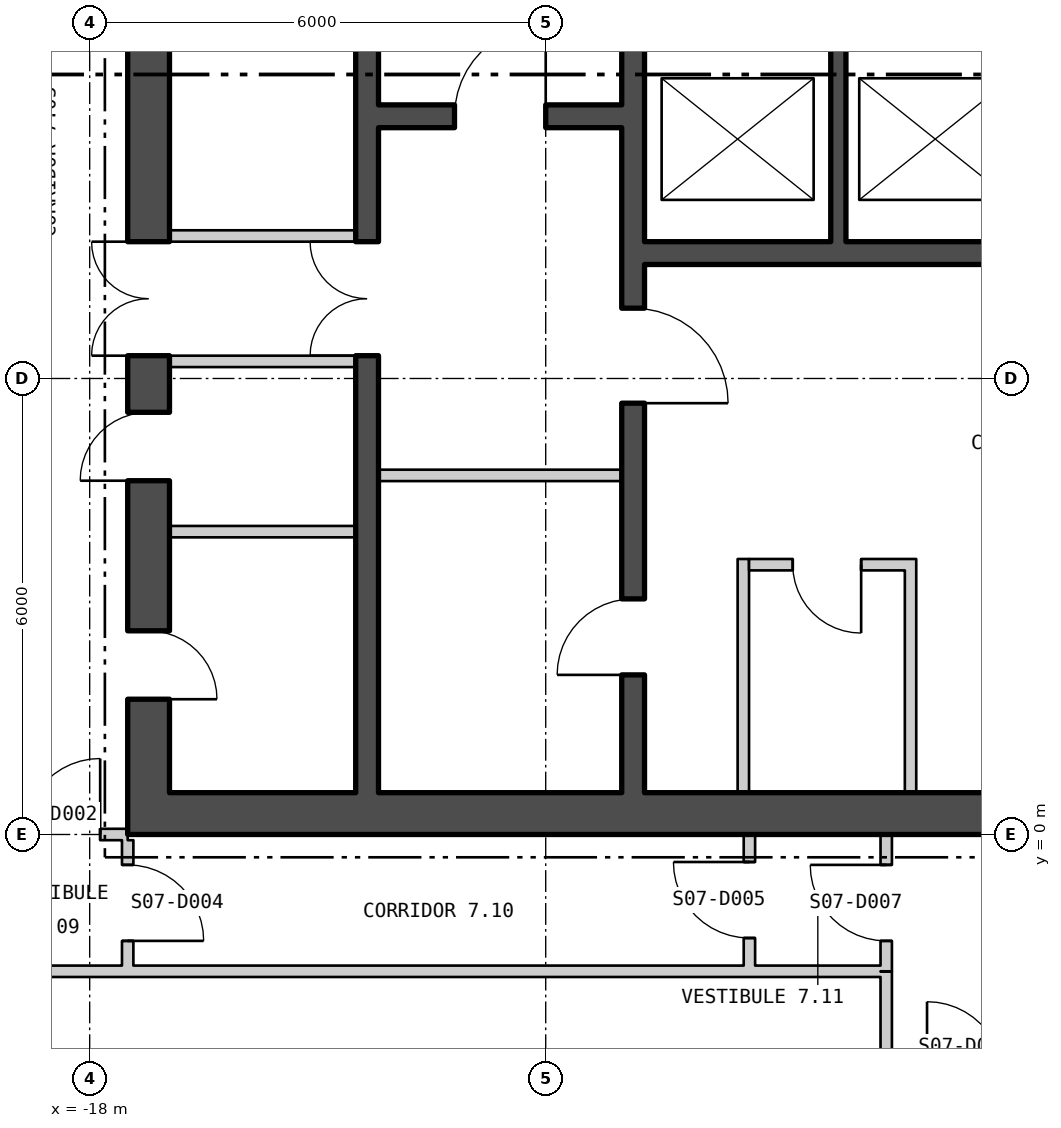
"""IFC4 building model, lengths in metres.
Left out: names, types, materials, properties, quantities, classifications, styles, units other than length and angle.
Written with IfcOpenShell. Run it as: python <this file> out.ifc"""

import sys

from ifc_helpers import new_model, si_unit, direction, frame, frame_2d, origin, place, context, subcontext, project, spatial, polyline, rectangle, outline, extrude, element, fill, save


model = new_model("IFC4")
c1 = context("Model", 3, precision=1e-05, world=origin(), true_north=direction((0.0, 1.0)))
c2 = subcontext(c1, "Body", "Model", "MODEL_VIEW")
j1 = project(units=[si_unit("LENGTHUNIT", "METRE"), si_unit("PLANEANGLEUNIT", "RADIAN")], contexts=[c1])
p1 = place(None, origin())
s1 = spatial("IfcSite", under=j1, at=p1, CompositionType="ELEMENT")
p2 = place(p1, origin())
s2 = spatial("IfcBuilding", under=s1, at=p2, CompositionType="ELEMENT")
p3 = place(p2, frame((0.0, 0.0, 97.8)))
s3 = spatial("IfcBuildingStorey", under=s2, at=p3, CompositionType="ELEMENT", Elevation=97.8)
p4 = place(p3, frame((-27.775, 11.479, -0.18), z_axis=(0.0, 0.0, 1.0), x_axis=(0.500000711659, -0.866024992908, 0.0)))
e1 = element("IfcWall", 1, at=p4, inside=s3, PredefinedType="SOLIDWALL", context=c2, shape_type="SweptSolid", body=[
    extrude(outline(polyline([(-0.13, -0.225), (45.87, -0.225), (45.61, 0.225), (0.13, 0.225), (-0.13, -0.225)])), origin(), (0.0, 0.0, 1.0), 4.28),
])
p5 = place(p4, frame((1.424, 0.0, 1.08)))
e2 = element("IfcOpeningElement", 2, at=p5, cuts=e1, PredefinedType="OPENING", context=c2, shape_type="SweptSolid", body=[
    extrude(rectangle(XDim=2.4, YDim=2.6, at=frame_2d((1.2, 1.3))), frame((0.0, 0.235, 0.0), z_axis=(0.0, -1.0, 0.0), x_axis=(1.0, 0.0, 0.0)), (0.0, 0.0, 1.0), 0.47),
])
p6 = place(p4, frame((5.893, 0.0, 1.08)))
e3 = element("IfcOpeningElement", 3, at=p6, cuts=e1, PredefinedType="OPENING", context=c2, shape_type="SweptSolid", body=[
    extrude(rectangle(XDim=2.4, YDim=2.6, at=frame_2d((1.2, 1.3))), frame((0.0, 0.235, 0.0), z_axis=(0.0, -1.0, 0.0), x_axis=(1.0, 0.0, 0.0)), (0.0, 0.0, 1.0), 0.47),
])
p7 = place(p4, frame((10.401, 0.0, 1.08)))
e4 = element("IfcOpeningElement", 4, at=p7, cuts=e1, PredefinedType="OPENING", context=c2, shape_type="SweptSolid", body=[
    extrude(rectangle(XDim=2.4, YDim=2.6, at=frame_2d((1.2, 1.3))), frame((0.0, 0.235, 0.0), z_axis=(0.0, -1.0, 0.0), x_axis=(1.0, 0.0, 0.0)), (0.0, 0.0, 1.0), 0.47),
])
p8 = place(p4, frame((14.909, 0.0, 1.08)))
e5 = element("IfcOpeningElement", 5, at=p8, cuts=e1, PredefinedType="OPENING", context=c2, shape_type="SweptSolid", body=[
    extrude(rectangle(XDim=2.4, YDim=2.6, at=frame_2d((1.2, 1.3))), frame((0.0, 0.235, 0.0), z_axis=(0.0, -1.0, 0.0), x_axis=(1.0, 0.0, 0.0)), (0.0, 0.0, 1.0), 0.47),
])
p9 = place(p4, frame((19.416, 0.0, 1.08)))
e6 = element("IfcOpeningElement", 6, at=p9, cuts=e1, PredefinedType="OPENING", context=c2, shape_type="SweptSolid", body=[
    extrude(rectangle(XDim=2.4, YDim=2.6, at=frame_2d((1.2, 1.3))), frame((0.0, 0.235, 0.0), z_axis=(0.0, -1.0, 0.0), x_axis=(1.0, 0.0, 0.0)), (0.0, 0.0, 1.0), 0.47),
])
p10 = place(p4, frame((23.924, 0.0, 1.08)))
e7 = element("IfcOpeningElement", 7, at=p10, cuts=e1, PredefinedType="OPENING", context=c2, shape_type="SweptSolid", body=[
    extrude(rectangle(XDim=2.4, YDim=2.6, at=frame_2d((1.2, 1.3))), frame((0.0, 0.235, 0.0), z_axis=(0.0, -1.0, 0.0), x_axis=(1.0, 0.0, 0.0)), (0.0, 0.0, 1.0), 0.47),
])
p11 = place(p4, frame((28.431, 0.0, 1.08)))
e8 = element("IfcOpeningElement", 8, at=p11, cuts=e1, PredefinedType="OPENING", context=c2, shape_type="SweptSolid", body=[
    extrude(rectangle(XDim=2.4, YDim=2.6, at=frame_2d((1.2, 1.3))), frame((0.0, 0.235, 0.0), z_axis=(0.0, -1.0, 0.0), x_axis=(1.0, 0.0, 0.0)), (0.0, 0.0, 1.0), 0.47),
])
p12 = place(p4, frame((32.939, 0.0, 1.08)))
e9 = element("IfcOpeningElement", 9, at=p12, cuts=e1, PredefinedType="OPENING", context=c2, shape_type="SweptSolid", body=[
    extrude(rectangle(XDim=2.4, YDim=2.6, at=frame_2d((1.2, 1.3))), frame((0.0, 0.235, 0.0), z_axis=(0.0, -1.0, 0.0), x_axis=(1.0, 0.0, 0.0)), (0.0, 0.0, 1.0), 0.47),
])
p13 = place(p4, frame((37.447, 0.0, 1.08)))
e10 = element("IfcOpeningElement", 10, at=p13, cuts=e1, PredefinedType="OPENING", context=c2, shape_type="SweptSolid", body=[
    extrude(rectangle(XDim=2.4, YDim=2.6, at=frame_2d((1.2, 1.3))), frame((0.0, 0.235, 0.0), z_axis=(0.0, -1.0, 0.0), x_axis=(1.0, 0.0, 0.0)), (0.0, 0.0, 1.0), 0.47),
])
p14 = place(p4, frame((41.916, 0.0, 1.08)))
e11 = element("IfcOpeningElement", 11, at=p14, cuts=e1, PredefinedType="OPENING", context=c2, shape_type="SweptSolid", body=[
    extrude(rectangle(XDim=2.4, YDim=2.6, at=frame_2d((1.2, 1.3))), frame((0.0, 0.235, 0.0), z_axis=(0.0, -1.0, 0.0), x_axis=(1.0, 0.0, 0.0)), (0.0, 0.0, 1.0), 0.47),
])
p15 = place(p3, frame((-17.5, 0.275, 0.0), z_axis=(0.0, 0.0, 1.0), x_axis=(1.0, 0.0, 0.0)))
e12 = element("IfcWall", 12, at=p15, inside=s3, PredefinedType="SHEAR", context=c2, shape_type="SweptSolid", body=[
    extrude(rectangle(XDim=35.0, YDim=0.55, at=frame_2d((17.5, 0.0))), origin(), (0.0, 0.0, 1.0), 4.3),
])
p16 = place(p15, frame((12.0, 0.0, 0.0)))
e13 = element("IfcOpeningElement", 13, at=p16, cuts=e12, PredefinedType="OPENING", context=c2, shape_type="SweptSolid", body=[
    extrude(rectangle(XDim=1.8, YDim=2.4, at=frame_2d((0.9, 1.2))), frame((0.0, 0.285, 0.0), z_axis=(0.0, -1.0, 0.0), x_axis=(1.0, 0.0, 0.0)), (0.0, 0.0, 1.0), 0.57),
])
p17 = place(p15, frame((22.0, 0.0, 0.0)))
e14 = element("IfcOpeningElement", 14, at=p17, cuts=e12, PredefinedType="OPENING", context=c2, shape_type="SweptSolid", body=[
    extrude(rectangle(XDim=1.8, YDim=2.4, at=frame_2d((0.9, 1.2))), frame((0.0, 0.285, 0.0), z_axis=(0.0, -1.0, 0.0), x_axis=(1.0, 0.0, 0.0)), (0.0, 0.0, 1.0), 0.57),
])
p18 = place(p3, frame((-17.225, 0.55, 0.0), z_axis=(0.0, 0.0, 1.0), x_axis=(0.0, 1.0, 0.0)))
e15 = element("IfcWall", 15, at=p18, inside=s3, PredefinedType="SHEAR", context=c2, shape_type="SweptSolid", body=[
    extrude(rectangle(XDim=16.9, YDim=0.55, at=frame_2d((8.45, 0.0))), origin(), (0.0, 0.0, 1.0), 4.3),
])
p19 = place(p18, frame((5.75, 0.0, 0.0)))
e16 = element("IfcOpeningElement", 16, at=p19, cuts=e15, PredefinedType="OPENING", context=c2, shape_type="SweptSolid", body=[
    extrude(rectangle(XDim=1.5, YDim=2.1, at=frame_2d((0.75, 1.05))), frame((0.0, 0.285, 0.0), z_axis=(0.0, -1.0, 0.0), x_axis=(1.0, 0.0, 0.0)), (0.0, 0.0, 1.0), 0.57),
])
p20 = place(p18, frame((1.23, 0.0, 0.0)))
e17 = element("IfcOpeningElement", 17, at=p20, cuts=e15, PredefinedType="OPENING", context=c2, shape_type="SweptSolid", body=[
    extrude(rectangle(XDim=0.9, YDim=2.1, at=frame_2d((0.45, 1.05))), frame((0.0, 0.285, 0.0), z_axis=(0.0, -1.0, 0.0), x_axis=(1.0, 0.0, 0.0)), (0.0, 0.0, 1.0), 0.57),
])
p21 = place(p18, frame((4.105, 0.0, 0.0)))
e18 = element("IfcOpeningElement", 18, at=p21, cuts=e15, PredefinedType="OPENING", context=c2, shape_type="SweptSolid", body=[
    extrude(rectangle(XDim=0.9, YDim=2.1, at=frame_2d((0.45, 1.05))), frame((0.0, 0.285, 0.0), z_axis=(0.0, -1.0, 0.0), x_axis=(1.0, 0.0, 0.0)), (0.0, 0.0, 1.0), 0.57),
])
p22 = place(p18, frame((10.452, 0.0, 0.0)))
e19 = element("IfcOpeningElement", 19, at=p22, cuts=e15, PredefinedType="OPENING", context=c2, shape_type="SweptSolid", body=[
    extrude(rectangle(XDim=0.9, YDim=2.1, at=frame_2d((0.45, 1.05))), frame((0.0, 0.285, 0.0), z_axis=(0.0, -1.0, 0.0), x_axis=(1.0, 0.0, 0.0)), (0.0, 0.0, 1.0), 0.57),
])
p23 = place(p18, frame((15.227, 0.0, 0.0)))
e20 = element("IfcOpeningElement", 20, at=p23, cuts=e15, PredefinedType="OPENING", context=c2, shape_type="SweptSolid", body=[
    extrude(rectangle(XDim=1.0, YDim=2.1, at=frame_2d((0.5, 1.05))), frame((0.0, 0.285, 0.0), z_axis=(0.0, -1.0, 0.0), x_axis=(1.0, 0.0, 0.0)), (0.0, 0.0, 1.0), 0.57),
])
p24 = place(p3, frame((-10.85, 0.55, 0.0), z_axis=(0.0, 0.0, 1.0), x_axis=(0.0, 1.0, 0.0)))
e21 = element("IfcWall", 21, at=p24, inside=s3, PredefinedType="SHEAR", context=c2, shape_type="SweptSolid", body=[
    extrude(rectangle(XDim=16.9, YDim=0.3, at=frame_2d((8.45, 0.0))), origin(), (0.0, 0.0, 1.0), 4.3),
])
p25 = place(p24, frame((5.125, 0.0, 0.0)))
e22 = element("IfcOpeningElement", 22, at=p25, cuts=e21, PredefinedType="OPENING", context=c2, shape_type="SweptSolid", body=[
    extrude(rectangle(XDim=1.25, YDim=2.1, at=frame_2d((0.625, 1.05))), frame((0.0, 0.16, 0.0), z_axis=(0.0, -1.0, 0.0), x_axis=(1.0, 0.0, 0.0)), (0.0, 0.0, 1.0), 0.32),
])
p26 = place(p24, frame((1.55, 0.0, 0.0)))
e23 = element("IfcOpeningElement", 23, at=p26, cuts=e21, PredefinedType="OPENING", context=c2, shape_type="SweptSolid", body=[
    extrude(rectangle(XDim=1.0, YDim=2.1, at=frame_2d((0.5, 1.05))), frame((0.0, 0.16, 0.0), z_axis=(0.0, -1.0, 0.0), x_axis=(1.0, 0.0, 0.0)), (0.0, 0.0, 1.0), 0.32),
])
p27 = place(p3, frame((-14.35, 0.55, 0.0), z_axis=(0.0, 0.0, 1.0), x_axis=(0.0, 1.0, 0.0)))
e24 = element("IfcWall", 24, at=p27, inside=s3, PredefinedType="SHEAR", context=c2, shape_type="SweptSolid", body=[
    extrude(rectangle(XDim=16.9, YDim=0.3, at=frame_2d((8.45, 0.0))), origin(), (0.0, 0.0, 1.0), 4.3),
])
p28 = place(p27, frame((5.75, 0.0, 0.0)))
e25 = element("IfcOpeningElement", 25, at=p28, cuts=e24, PredefinedType="OPENING", context=c2, shape_type="SweptSolid", body=[
    extrude(rectangle(XDim=1.5, YDim=2.1, at=frame_2d((0.75, 1.05))), frame((0.0, 0.16, 0.0), z_axis=(0.0, -1.0, 0.0), x_axis=(1.0, 0.0, 0.0)), (0.0, 0.0, 1.0), 0.32),
])
p29 = place(p3, frame((-14.2, 9.45, 0.0), z_axis=(0.0, 0.0, 1.0), x_axis=(1.0, 0.0, 0.0)))
e26 = element("IfcWall", 26, at=p29, inside=s3, PredefinedType="SHEAR", context=c2, shape_type="SweptSolid", body=[
    extrude(rectangle(XDim=3.2, YDim=0.3, at=frame_2d((1.6, 0.0))), origin(), (0.0, 0.0, 1.0), 4.3),
])
p30 = place(p29, frame((1.0, 0.0, 0.0)))
e27 = element("IfcOpeningElement", 27, at=p30, cuts=e26, PredefinedType="OPENING", context=c2, shape_type="SweptSolid", body=[
    extrude(rectangle(XDim=1.2, YDim=2.1, at=frame_2d((0.6, 1.05))), frame((0.0, 0.16, 0.0), z_axis=(0.0, -1.0, 0.0), x_axis=(1.0, 0.0, 0.0)), (0.0, 0.0, 1.0), 0.32),
])
p31 = place(p3, frame((-10.7, 7.65, 0.0), z_axis=(0.0, 0.0, 1.0), x_axis=(1.0, 0.0, 0.0)))
e28 = element("IfcWall", 28, at=p31, inside=s3, PredefinedType="SHEAR", context=c2, shape_type="SweptSolid", body=[
    extrude(rectangle(XDim=10.3, YDim=0.3, at=frame_2d((5.15, 0.0))), origin(), (0.0, 0.0, 1.0), 4.3),
])
p32 = place(p3, frame((-8.15, 7.8, 0.0), z_axis=(0.0, 0.0, 1.0), x_axis=(0.0, 1.0, 0.0)))
e29 = element("IfcWall", 29, at=p32, inside=s3, PredefinedType="SHEAR", context=c2, shape_type="SweptSolid", body=[
    extrude(rectangle(XDim=2.7, YDim=0.2, at=frame_2d((1.35, 0.0))), origin(), (0.0, 0.0, 1.0), 4.3),
])
p33 = place(p3, frame((-14.2, 4.725, 0.0), z_axis=(0.0, 0.0, 1.0), x_axis=(1.0, 0.0, 0.0)))
e30 = element("IfcWall", 30, at=p33, inside=s3, PredefinedType="PARTITIONING", context=c2, shape_type="SweptSolid", body=[
    extrude(rectangle(XDim=3.2, YDim=0.15, at=frame_2d((1.6, 0.0))), origin(), (0.0, 0.0, 1.0), 4.3),
])
for number, where, z_axis, x_axis in (
    (31, (-16.95, 6.225, 0.0), (0.0, 0.0, 1.0), (1.0, 0.0, 0.0)),
    (32, (-16.95, 7.875, 0.0), (0.0, 0.0, 1.0), (1.0, 0.0, 0.0)),
    (33, (-16.95, 3.985, 0.0), (0.0, 0.0, 1.0), (1.0, 0.0, 0.0)),
):
    element("IfcWall", number, at=place(p3, frame(where, z_axis=z_axis, x_axis=x_axis)), inside=s3, PredefinedType="PARTITIONING", context=c2, shape_type="SweptSolid", body=[
        extrude(rectangle(XDim=2.45, YDim=0.15, at=frame_2d((1.225, 0.0))), origin(), (0.0, 0.0, 1.0), 4.3),
    ])
for number, where, z_axis, x_axis in (
    (34, (-9.4, 0.55, 0.0), (0.0, 0.0, 1.0), (0.0, 1.0, 0.0)),
    (35, (-7.2, 0.55, 0.0), (0.0, 0.0, 1.0), (0.0, 1.0, 0.0)),
):
    element("IfcWall", number, at=place(p3, frame(where, z_axis=z_axis, x_axis=x_axis)), inside=s3, PredefinedType="PARTITIONING", context=c2, shape_type="SweptSolid", body=[
        extrude(rectangle(XDim=3.075, YDim=0.15, at=frame_2d((1.538, 0.0))), origin(), (0.0, 0.0, 1.0), 4.3),
    ])
p34 = place(p3, frame((-9.325, 3.55, 0.0), z_axis=(0.0, 0.0, 1.0), x_axis=(1.0, 0.0, 0.0)))
e36 = element("IfcWall", 36, at=p34, inside=s3, PredefinedType="PARTITIONING", context=c2, shape_type="SweptSolid", body=[
    extrude(rectangle(XDim=2.05, YDim=0.15, at=frame_2d((1.025, 0.0))), origin(), (0.0, 0.0, 1.0), 4.3),
])
p35 = place(p34, frame((0.575, 0.0, 0.0)))
e37 = element("IfcOpeningElement", 37, at=p35, cuts=e36, PredefinedType="OPENING", context=c2, shape_type="SweptSolid", body=[
    extrude(rectangle(XDim=0.9, YDim=2.1, at=frame_2d((0.45, 1.05))), frame((0.0, 0.085, 0.0), z_axis=(0.0, -1.0, 0.0), x_axis=(1.0, 0.0, 0.0)), (0.0, 0.0, 1.0), 0.17),
])
p36 = place(p3, frame((-19.225, -1.8, 0.0), z_axis=(0.0, 0.0, 1.0), x_axis=(1.0, 0.0, 0.0)))
e38 = element("IfcWall", 38, at=p36, inside=s3, PredefinedType="PARTITIONING", context=c2, shape_type="SweptSolid", body=[
    extrude(rectangle(XDim=11.63, YDim=0.15, at=frame_2d((5.815, 0.0))), origin(), (0.0, 0.0, 1.0), 4.3),
])
p37 = place(p3, frame((-19.225, 0.0, 0.0), z_axis=(0.0, 0.0, 1.0), x_axis=(1.0, 0.0, 0.0)))
e39 = element("IfcWall", 39, at=p37, inside=s3, PredefinedType="PARTITIONING", context=c2, shape_type="SweptSolid", body=[
    extrude(rectangle(XDim=1.725, YDim=0.15, at=frame_2d((0.863, 0.0))), origin(), (0.0, 0.0, 1.0), 3.7),
])
p38 = place(p37, frame((0.363, 0.0, 0.0)))
e40 = element("IfcOpeningElement", 40, at=p38, cuts=e39, PredefinedType="OPENING", context=c2, shape_type="SweptSolid", body=[
    extrude(rectangle(XDim=1.0, YDim=2.1, at=frame_2d((0.5, 1.05))), frame((0.0, 0.085, 0.0), z_axis=(0.0, -1.0, 0.0), x_axis=(1.0, 0.0, 0.0)), (0.0, 0.0, 1.0), 0.17),
])
p39 = place(p3, frame((-17.5, -1.725, 0.0), z_axis=(0.0, 0.0, 1.0), x_axis=(0.0, 1.0, 0.0)))
e41 = element("IfcWall", 41, at=p39, inside=s3, PredefinedType="PARTITIONING", context=c2, shape_type="SweptSolid", body=[
    extrude(rectangle(XDim=1.65, YDim=0.15, at=frame_2d((0.825, 0.0))), origin(), (0.0, 0.0, 1.0), 4.3),
])
p40 = place(p39, frame((0.325, 0.0, 0.0)))
e42 = element("IfcOpeningElement", 42, at=p40, cuts=e41, PredefinedType="OPENING", context=c2, shape_type="SweptSolid", body=[
    extrude(rectangle(XDim=1.0, YDim=2.1, at=frame_2d((0.5, 1.05))), frame((0.0, 0.085, 0.0), z_axis=(0.0, -1.0, 0.0), x_axis=(1.0, 0.0, 0.0)), (0.0, 0.0, 1.0), 0.17),
])
p41 = place(p3, frame((-9.32, -1.725, 0.0), z_axis=(0.0, 0.0, 1.0), x_axis=(0.0, 1.0, 0.0)))
e43 = element("IfcWall", 43, at=p41, inside=s3, PredefinedType="PARTITIONING", context=c2, shape_type="SweptSolid", body=[
    extrude(rectangle(XDim=1.725, YDim=0.15, at=frame_2d((0.863, 0.0))), origin(), (0.0, 0.0, 1.0), 4.3),
])
p42 = place(p41, frame((0.363, 0.0, 0.0)))
e44 = element("IfcOpeningElement", 44, at=p42, cuts=e43, PredefinedType="OPENING", context=c2, shape_type="SweptSolid", body=[
    extrude(rectangle(XDim=1.0, YDim=2.1, at=frame_2d((0.5, 1.05))), frame((0.0, 0.085, 0.0), z_axis=(0.0, -1.0, 0.0), x_axis=(1.0, 0.0, 0.0)), (0.0, 0.0, 1.0), 0.17),
])
p43 = place(p3, frame((-7.52, -3.508, 0.0), z_axis=(0.0, 0.0, 1.0), x_axis=(0.0, 1.0, 0.0)))
e45 = element("IfcWall", 45, at=p43, inside=s3, PredefinedType="PARTITIONING", context=c2, shape_type="SweptSolid", body=[
    extrude(rectangle(XDim=1.704, YDim=0.15, at=frame_2d((0.852, 0.0))), origin(), (0.0, 0.0, 1.0), 4.3),
])
p44 = place(p3, frame((-7.52, -1.8, 0.0), z_axis=(0.0, 0.0, 1.0), x_axis=(0.0, 1.0, 0.0)))
e46 = element("IfcWall", 46, at=p44, inside=s3, PredefinedType="PARTITIONING", context=c2, shape_type="SweptSolid", body=[
    extrude(rectangle(XDim=1.8, YDim=0.15, at=frame_2d((0.9, 0.0))), origin(), (0.0, 0.0, 1.0), 4.3),
])
p45 = place(p44, frame((0.4, 0.0, 0.0)))
e47 = element("IfcOpeningElement", 47, at=p45, cuts=e46, PredefinedType="OPENING", context=c2, shape_type="SweptSolid", body=[
    extrude(rectangle(XDim=1.0, YDim=2.1, at=frame_2d((0.5, 1.05))), frame((0.0, 0.085, 0.0), z_axis=(0.0, -1.0, 0.0), x_axis=(1.0, 0.0, 0.0)), (0.0, 0.0, 1.0), 0.17),
])
p46 = place(p30, origin())
e48 = element("IfcDoor", 48, at=p46, inside=s3, OperationType="SINGLE_SWING_LEFT", PredefinedType="DOOR", context=c2, shape_type="SweptSolid", body=[
    extrude(rectangle(XDim=1.2, YDim=2.1, at=frame_2d((0.6, 1.05))), frame((0.0, 0.025, 0.0), z_axis=(0.0, -1.0, 0.0), x_axis=(1.0, 0.0, 0.0)), (0.0, 0.0, 1.0), 0.05),
])
fill(e27, e48)
p47 = place(p25, origin())
e49 = element("IfcDoor", 49, at=p47, inside=s3, OperationType="SINGLE_SWING_LEFT", PredefinedType="DOOR", context=c2, shape_type="SweptSolid", body=[
    extrude(rectangle(XDim=1.25, YDim=2.1, at=frame_2d((0.625, 1.05))), frame((0.0, 0.025, 0.0), z_axis=(0.0, -1.0, 0.0), x_axis=(1.0, 0.0, 0.0)), (0.0, 0.0, 1.0), 0.05),
])
fill(e22, e49)
p48 = place(p26, origin())
e50 = element("IfcDoor", 50, at=p48, inside=s3, OperationType="SINGLE_SWING_RIGHT", PredefinedType="DOOR", context=c2, shape_type="SweptSolid", body=[
    extrude(rectangle(XDim=1.0, YDim=2.1, at=frame_2d((0.5, 1.05))), frame((0.0, 0.025, 0.0), z_axis=(0.0, -1.0, 0.0), x_axis=(1.0, 0.0, 0.0)), (0.0, 0.0, 1.0), 0.05),
])
fill(e23, e50)
p49 = place(p28, origin())
e51 = element("IfcDoor", 51, at=p49, inside=s3, OperationType="DOUBLE_DOOR_SINGLE_SWING", PredefinedType="DOOR", context=c2, shape_type="SweptSolid", body=[
    extrude(rectangle(XDim=1.5, YDim=2.1, at=frame_2d((0.75, 1.05))), frame((0.0, 0.025, 0.0), z_axis=(0.0, -1.0, 0.0), x_axis=(1.0, 0.0, 0.0)), (0.0, 0.0, 1.0), 0.05),
])
fill(e25, e51)
p50 = place(p19, origin())
e52 = element("IfcDoor", 52, at=p50, inside=s3, OperationType="DOUBLE_DOOR_SINGLE_SWING", PredefinedType="DOOR", context=c2, shape_type="SweptSolid", body=[
    extrude(rectangle(XDim=1.5, YDim=2.1, at=frame_2d((0.75, 1.05))), frame((0.0, 0.025, 0.0), z_axis=(0.0, -1.0, 0.0), x_axis=(1.0, 0.0, 0.0)), (0.0, 0.0, 1.0), 0.05),
])
fill(e16, e52)
p51 = place(p20, origin())
e53 = element("IfcDoor", 53, at=p51, inside=s3, OperationType="SINGLE_SWING_LEFT", PredefinedType="DOOR", context=c2, shape_type="SweptSolid", body=[
    extrude(rectangle(XDim=0.9, YDim=2.1, at=frame_2d((0.45, 1.05))), frame((0.0, 0.025, 0.0), z_axis=(0.0, -1.0, 0.0), x_axis=(1.0, 0.0, 0.0)), (0.0, 0.0, 1.0), 0.05),
])
fill(e17, e53)
p52 = place(p21, origin())
e54 = element("IfcDoor", 54, at=p52, inside=s3, OperationType="SINGLE_SWING_RIGHT", PredefinedType="DOOR", context=c2, shape_type="SweptSolid", body=[
    extrude(rectangle(XDim=0.9, YDim=2.1, at=frame_2d((0.45, 1.05))), frame((0.0, 0.025, 0.0), z_axis=(0.0, -1.0, 0.0), x_axis=(1.0, 0.0, 0.0)), (0.0, 0.0, 1.0), 0.05),
])
fill(e18, e54)
p53 = place(p35, origin())
e55 = element("IfcDoor", 55, at=p53, inside=s3, OperationType="SINGLE_SWING_RIGHT", PredefinedType="DOOR", context=c2, shape_type="SweptSolid", body=[
    extrude(rectangle(XDim=0.9, YDim=2.1, at=frame_2d((0.45, 1.05))), frame((0.0, 0.025, 0.0), z_axis=(0.0, -1.0, 0.0), x_axis=(1.0, 0.0, 0.0)), (0.0, 0.0, 1.0), 0.05),
])
fill(e37, e55)
p54 = place(p38, origin())
e56 = element("IfcDoor", 56, at=p54, inside=s3, OperationType="SINGLE_SWING_LEFT", PredefinedType="DOOR", context=c2, shape_type="SweptSolid", body=[
    extrude(rectangle(XDim=1.0, YDim=2.1, at=frame_2d((0.5, 1.05))), frame((0.0, 0.025, 0.0), z_axis=(0.0, -1.0, 0.0), x_axis=(1.0, 0.0, 0.0)), (0.0, 0.0, 1.0), 0.05),
])
fill(e40, e56)
p55 = place(p40, origin())
e57 = element("IfcDoor", 57, at=p55, inside=s3, OperationType="SINGLE_SWING_LEFT", PredefinedType="DOOR", context=c2, shape_type="SweptSolid", body=[
    extrude(rectangle(XDim=1.0, YDim=2.1, at=frame_2d((0.5, 1.05))), frame((0.0, 0.025, 0.0), z_axis=(0.0, -1.0, 0.0), x_axis=(1.0, 0.0, 0.0)), (0.0, 0.0, 1.0), 0.05),
])
fill(e42, e57)
p56 = place(p42, origin())
e58 = element("IfcDoor", 58, at=p56, inside=s3, OperationType="SINGLE_SWING_LEFT", PredefinedType="DOOR", context=c2, shape_type="SweptSolid", body=[
    extrude(rectangle(XDim=1.0, YDim=2.1, at=frame_2d((0.5, 1.05))), frame((0.0, 0.025, 0.0), z_axis=(0.0, -1.0, 0.0), x_axis=(1.0, 0.0, 0.0)), (0.0, 0.0, 1.0), 0.05),
])
fill(e44, e58)
p57 = place(p45, origin())
e59 = element("IfcDoor", 59, at=p57, inside=s3, OperationType="SINGLE_SWING_LEFT", PredefinedType="DOOR", context=c2, shape_type="SweptSolid", body=[
    extrude(rectangle(XDim=1.0, YDim=2.1, at=frame_2d((0.5, 1.05))), frame((0.0, 0.025, 0.0), z_axis=(0.0, -1.0, 0.0), x_axis=(1.0, 0.0, 0.0)), (0.0, 0.0, 1.0), 0.05),
])
fill(e47, e59)
save(model, sys.argv[1])
